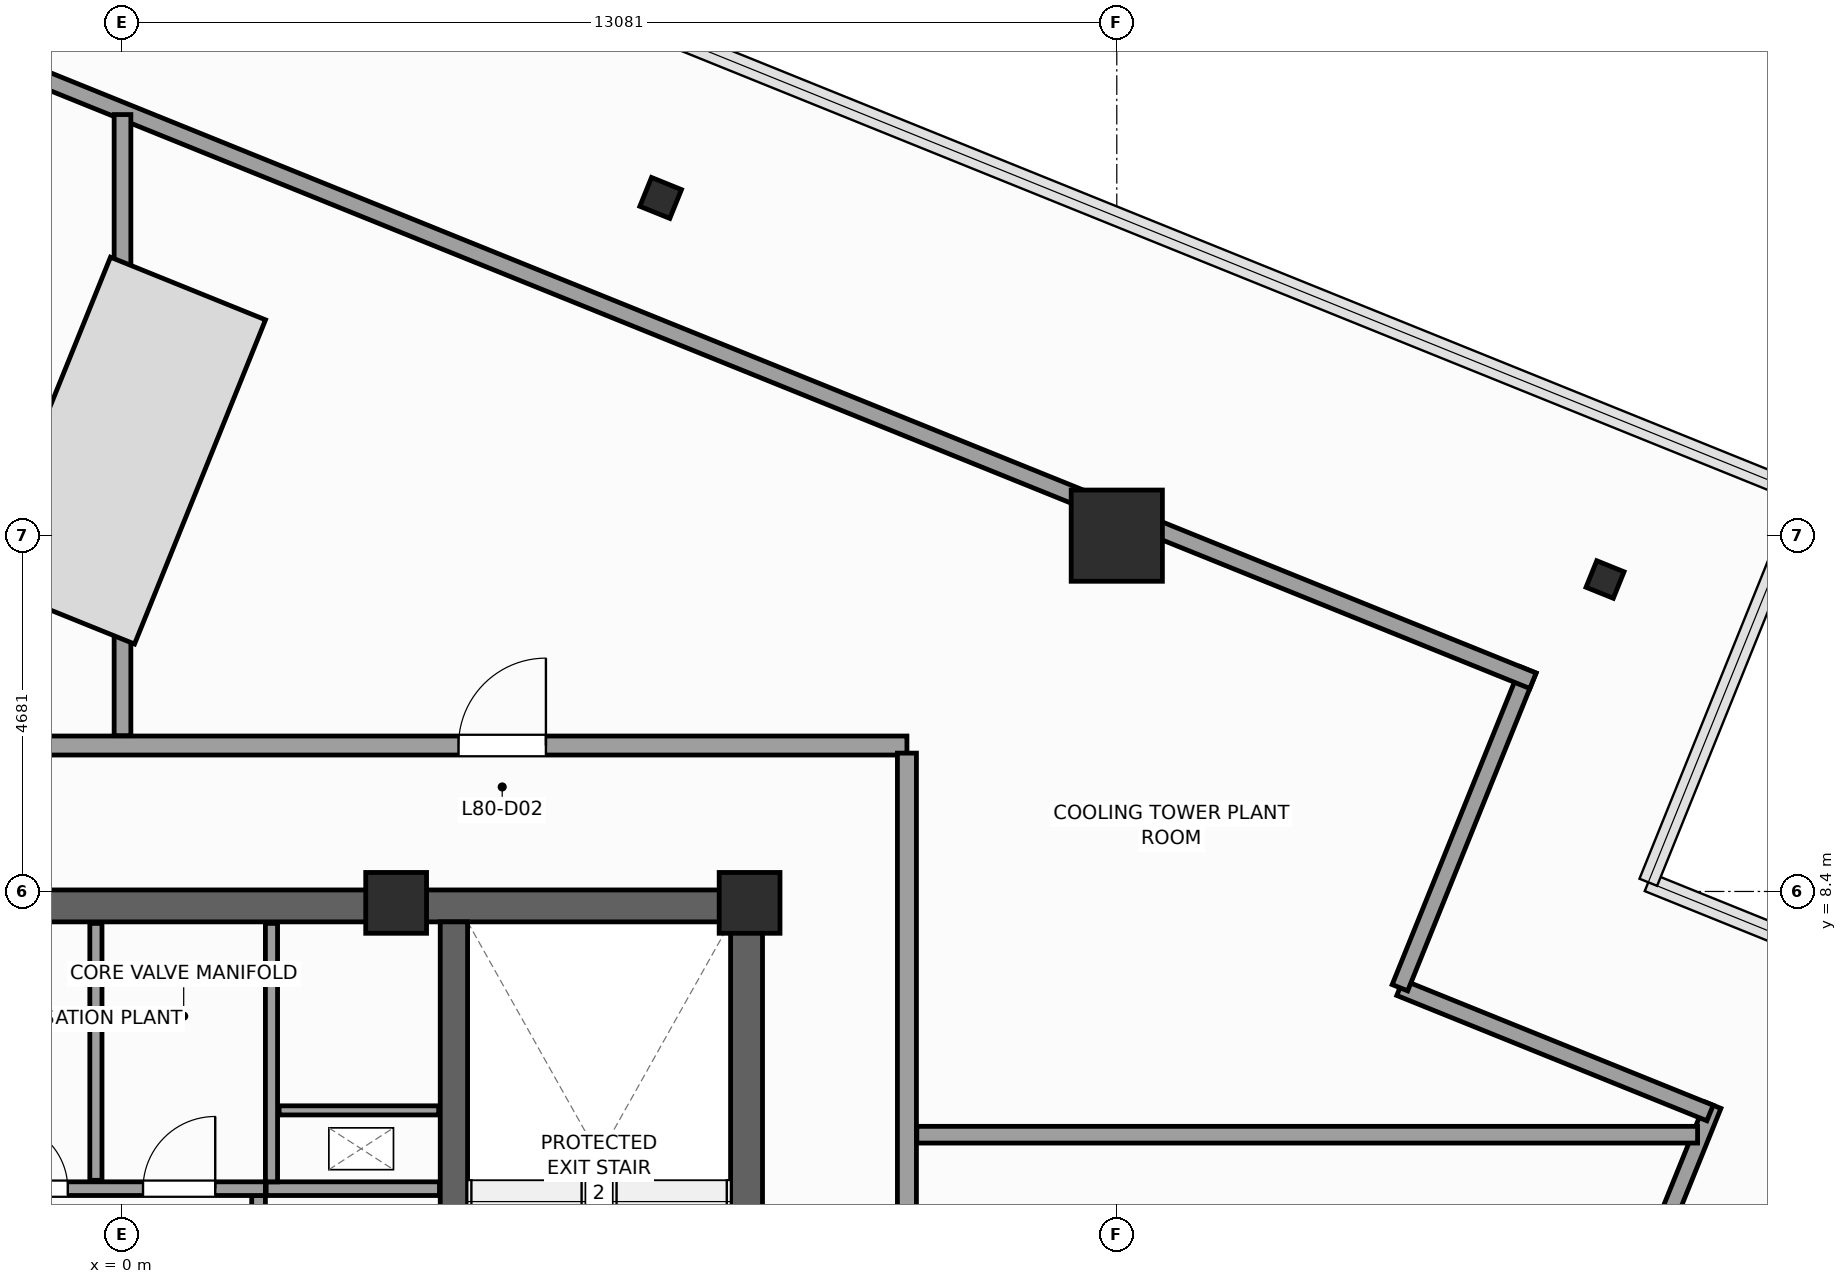
"""IFC4 building model, lengths in metres.
Left out: names, types, materials, properties, quantities, classifications, styles, units other than length and angle.
Written with IfcOpenShell. Run it as: python <this file> out.ifc"""

import sys

from ifc_helpers import new_model, si_unit, direction, frame, frame_2d, origin, origin_2d, place, context, subcontext, project, spatial, rectangle, i_section, extrude, source, transform, mapped, element, fill, save


model = new_model("IFC4")
c1 = context("Model", 3, precision=1e-05, world=origin(), true_north=direction((0.0, 1.0)))
c2 = subcontext(c1, "Body", "Model", "MODEL_VIEW")
j1 = project(units=[si_unit("LENGTHUNIT", "METRE"), si_unit("PLANEANGLEUNIT", "RADIAN")], contexts=[c1])
p1 = place(None, origin())
s1 = spatial("IfcSite", under=j1, at=p1, CompositionType="ELEMENT")
p2 = place(p1, origin())
s2 = spatial("IfcBuilding", under=s1, at=p2, CompositionType="ELEMENT")
p3 = place(p2, frame((0.0, 0.0, 325.6)))
s3 = spatial("IfcBuildingStorey", under=s2, at=p3, CompositionType="ELEMENT", Elevation=325.6)
p4 = place(p3, frame((-8.42, 8.21, 0.0), z_axis=(0.0, 0.0, 1.0), x_axis=(1.0, 0.0, 0.0)))
e1 = element("IfcWall", 1, at=p4, inside=s3, PredefinedType="SHEAR", context=c2, shape_type="SweptSolid", body=[
    extrude(rectangle(XDim=16.84, YDim=0.42, at=frame_2d((8.42, 0.0))), origin(), (0.0, 0.0, 1.0), 4.0),
])
p5 = place(p3, frame((8.21, -8.0, 0.0), z_axis=(0.0, 0.0, 1.0), x_axis=(0.0, 1.0, 0.0)))
e2 = element("IfcWall", 2, at=p5, inside=s3, PredefinedType="SHEAR", context=c2, shape_type="SweptSolid", body=[
    extrude(rectangle(XDim=16.0, YDim=0.42, at=frame_2d((8.0, 0.0))), origin(), (0.0, 0.0, 1.0), 4.0),
])
p6 = place(p5, frame((4.69, 0.0, 0.0)))
e3 = element("IfcOpeningElement", 3, at=p6, cuts=e2, PredefinedType="OPENING", context=c2, shape_type="SweptSolid", body=[
    extrude(rectangle(XDim=1.3, YDim=2.2, at=frame_2d((0.65, 1.1))), frame((0.0, 0.22, 0.0), z_axis=(0.0, -1.0, 0.0), x_axis=(1.0, 0.0, 0.0)), (0.0, 0.0, 1.0), 0.44),
])
p7 = place(p3, frame((4.36, -8.0, 0.0), z_axis=(0.0, 0.0, 1.0), x_axis=(0.0, 1.0, 0.0)))
e4 = element("IfcWall", 4, at=p7, inside=s3, PredefinedType="SHEAR", context=c2, shape_type="SweptSolid", body=[
    extrude(rectangle(XDim=16.0, YDim=0.36, at=frame_2d((8.0, 0.0))), origin(), (0.0, 0.0, 1.0), 4.0),
])
m1 = source(origin(), c2, "Body", "SweptSolid", [
    extrude(rectangle(XDim=0.8, YDim=0.8, at=origin_2d()), origin(), (0.0, 0.0, 1.0), 4.0),
])
for number, where, z_axis, x_axis in (
    (5, (8.25, 8.25, 0.0), (0.0, 0.0, 1.0), (1.0, 0.0, 0.0)),
    (6, (3.6, 8.25, 0.0), (0.0, 0.0, 1.0), (1.0, 0.0, 0.0)),
):
    element("IfcColumn", number, at=place(p3, frame(where, z_axis=z_axis, x_axis=x_axis)), inside=s3, PredefinedType="PILASTER", context=c2, shape_type="MappedRepresentation", body=[
        mapped(m1, transform((0.0, 0.0, 0.0), scale=1.0)),
    ])
m2 = source(origin(), c2, "Body", "SweptSolid", [
    extrude(rectangle(XDim=1.2, YDim=1.2, at=origin_2d()), origin(), (0.0, 0.0, 1.0), 4.0),
])
p8 = place(p3, frame((13.081, 13.081, 0.0), z_axis=(0.0, 0.0, 1.0), x_axis=(1.0, 0.0, 0.0)))
e7 = element("IfcColumn", 7, at=p8, inside=s3, PredefinedType="COLUMN", context=c2, shape_type="MappedRepresentation", body=[
    mapped(m2, transform((0.0, 0.0, 0.0), scale=1.0)),
])
m3 = source(origin(), c2, "Body", "SweptSolid", [
    extrude(i_section(OverallWidth=0.376, OverallDepth=0.387, WebThickness=0.02, FlangeThickness=0.032, FilletRadius=0.015, at=origin_2d()), origin(), (0.0, 0.0, 1.0), 4.0),
])
p9 = place(p3, frame((19.504, 12.504, 0.0), z_axis=(0.0, 0.0, 1.0), x_axis=(0.374606593416, 0.927183854567, 0.0)))
e8 = element("IfcColumn", 8, at=p9, inside=s3, PredefinedType="COLUMN", context=c2, shape_type="MappedRepresentation", body=[
    mapped(m3, transform((0.0, 0.0, 0.0), scale=1.0)),
])
m4 = source(origin(), c2, "Body", "SweptSolid", [
    extrude(i_section(OverallWidth=0.409, OverallDepth=0.425, WebThickness=0.024, FlangeThickness=0.039, FilletRadius=0.015, at=origin_2d()), origin(), (0.0, 0.0, 1.0), 4.0),
])
p10 = place(p3, frame((7.08, 17.524, 0.0), z_axis=(0.0, 0.0, 1.0), x_axis=(0.374606593416, 0.927183854567, 0.0)))
e9 = element("IfcColumn", 9, at=p10, inside=s3, PredefinedType="COLUMN", context=c2, shape_type="MappedRepresentation", body=[
    mapped(m4, transform((0.0, 0.0, 0.0), scale=1.0)),
])
p11 = place(p3, frame((1.79, -7.98, 0.0), z_axis=(0.0, 0.0, 1.0), x_axis=(0.0, 1.0, 0.0)))
e10 = element("IfcWall", 10, at=p11, inside=s3, PredefinedType="PARTITIONING", context=c2, shape_type="SweptSolid", body=[
    extrude(rectangle(XDim=12.38, YDim=0.18, at=frame_2d((6.19, 0.0))), origin(), (0.0, 0.0, 1.0), 3.7),
])
p12 = place(p11, frame((3.5, 0.0, 0.0)))
e11 = element("IfcOpeningElement", 11, at=p12, cuts=e10, PredefinedType="OPENING", context=c2, shape_type="SweptSolid", body=[
    extrude(rectangle(XDim=1.15, YDim=2.25, at=frame_2d((0.575, 1.125))), frame((0.0, 0.1, 0.0), z_axis=(0.0, -1.0, 0.0), x_axis=(1.0, 0.0, 0.0)), (0.0, 0.0, 1.0), 0.2),
])
p13 = place(p11, frame((9.8, 0.0, 0.0)))
e12 = element("IfcOpeningElement", 12, at=p13, cuts=e10, PredefinedType="OPENING", context=c2, shape_type="SweptSolid", body=[
    extrude(rectangle(XDim=1.15, YDim=2.25, at=frame_2d((0.575, 1.125))), frame((0.0, 0.1, 0.0), z_axis=(0.0, -1.0, 0.0), x_axis=(1.0, 0.0, 0.0)), (0.0, 0.0, 1.0), 0.2),
])
p14 = place(p3, frame((-1.88, 4.49, 0.0), z_axis=(0.0, 0.0, 1.0), x_axis=(1.0, 0.0, 0.0)))
e13 = element("IfcWall", 13, at=p14, inside=s3, PredefinedType="PARTITIONING", context=c2, shape_type="SweptSolid", body=[
    extrude(rectangle(XDim=3.76, YDim=0.18, at=frame_2d((1.88, 0.0))), origin(), (0.0, 0.0, 1.0), 3.7),
])
p15 = place(p14, frame((0.28, 0.0, 0.0)))
e14 = element("IfcOpeningElement", 14, at=p15, cuts=e13, PredefinedType="OPENING", context=c2, shape_type="SweptSolid", body=[
    extrude(rectangle(XDim=0.88, YDim=2.1, at=frame_2d((0.44, 1.05))), frame((0.0, 0.1, 0.0), z_axis=(0.0, -1.0, 0.0), x_axis=(1.0, 0.0, 0.0)), (0.0, 0.0, 1.0), 0.2),
])
p16 = place(p14, frame((2.15, 0.0, 0.0)))
e15 = element("IfcOpeningElement", 15, at=p16, cuts=e13, PredefinedType="OPENING", context=c2, shape_type="SweptSolid", body=[
    extrude(rectangle(XDim=0.95, YDim=2.1, at=frame_2d((0.475, 1.05))), frame((0.0, 0.1, 0.0), z_axis=(0.0, -1.0, 0.0), x_axis=(1.0, 0.0, 0.0)), (0.0, 0.0, 1.0), 0.2),
])
p17 = place(p3, frame((1.89, 4.49, 0.0), z_axis=(0.0, 0.0, 1.0), x_axis=(1.0, 0.0, 0.0)))
e16 = element("IfcWall", 16, at=p17, inside=s3, PredefinedType="PARTITIONING", context=c2, shape_type="SweptSolid", body=[
    extrude(rectangle(XDim=2.28, YDim=0.18, at=frame_2d((1.14, 0.0))), origin(), (0.0, 0.0, 1.0), 3.7),
])
p18 = place(p3, frame((1.96, 4.58, 0.0), z_axis=(0.0, 0.0, 1.0), x_axis=(0.0, 1.0, 0.0)))
e17 = element("IfcWall", 17, at=p18, inside=s3, PredefinedType="PARTITIONING", context=c2, shape_type="SweptSolid", body=[
    extrude(rectangle(XDim=3.4, YDim=0.16, at=frame_2d((1.7, 0.0))), origin(), (0.0, 0.0, 1.0), 3.7),
])
p19 = place(p3, frame((2.06, 5.52, 0.0), z_axis=(0.0, 0.0, 1.0), x_axis=(1.0, 0.0, 0.0)))
e18 = element("IfcWall", 18, at=p19, inside=s3, PredefinedType="PARTITIONING", context=c2, shape_type="SweptSolid", body=[
    extrude(rectangle(XDim=2.1, YDim=0.12, at=frame_2d((1.05, 0.0))), origin(), (0.0, 0.0, 1.0), 3.7),
])
p20 = place(p3, frame((-0.35, 4.6, 0.0), z_axis=(0.0, 0.0, 1.0), x_axis=(0.0, 1.0, 0.0)))
e19 = element("IfcWall", 19, at=p20, inside=s3, PredefinedType="PARTITIONING", context=c2, shape_type="SweptSolid", body=[
    extrude(rectangle(XDim=3.38, YDim=0.16, at=frame_2d((1.69, 0.0))), origin(), (0.0, 0.0, 1.0), 3.7),
])
p21 = place(p3, frame((11.172, -18.556, 0.0), z_axis=(0.0, 0.0, 1.0), x_axis=(0.374611707018, 0.927181788521, 0.0)))
e20 = element("IfcWall", 20, at=p21, inside=s3, PredefinedType="PARTITIONING", context=c2, shape_type="SweptSolid", body=[
    extrude(rectangle(XDim=26.04, YDim=0.22, at=frame_2d((13.02, 0.0))), origin(), (0.0, 0.0, 1.0), 3.05),
])
p22 = place(p3, frame((20.886, 5.486, 0.0), z_axis=(0.0, 0.0, 1.0), x_axis=(-0.927189216671, 0.374593321469, 0.0)))
e21 = element("IfcWall", 21, at=p22, inside=s3, PredefinedType="PARTITIONING", context=c2, shape_type="SweptSolid", body=[
    extrude(rectangle(XDim=4.4, YDim=0.22, at=frame_2d((2.2, 0.0))), origin(), (0.0, 0.0, 1.0), 3.7),
])
p23 = place(p3, frame((16.806, 7.134, 0.0), z_axis=(0.0, 0.0, 1.0), x_axis=(0.374599091925, 0.927186885331, 0.0)))
e22 = element("IfcWall", 22, at=p23, inside=s3, PredefinedType="PARTITIONING", context=c2, shape_type="SweptSolid", body=[
    extrude(rectangle(XDim=4.51, YDim=0.22, at=frame_2d((2.255, 0.0))), origin(), (0.0, 0.0, 1.0), 3.7),
])
p24 = place(p3, frame((18.556, 11.172, 0.0), z_axis=(0.0, 0.0, 1.0), x_axis=(-0.927181788521, 0.374611707018, 0.0)))
e23 = element("IfcWall", 23, at=p24, inside=s3, PredefinedType="PARTITIONING", context=c2, shape_type="SweptSolid", body=[
    extrude(rectangle(XDim=26.04, YDim=0.22, at=frame_2d((13.02, 0.0))), origin(), (0.0, 0.0, 1.0), 3.05),
])
p25 = place(p3, frame((-10.32, 10.32, 0.0), z_axis=(0.0, 0.0, 1.0), x_axis=(1.0, 0.0, 0.0)))
e24 = element("IfcWall", 24, at=p25, inside=s3, PredefinedType="PARTITIONING", context=c2, shape_type="SweptSolid", body=[
    extrude(rectangle(XDim=20.64, YDim=0.25, at=frame_2d((10.32, 0.0))), origin(), (0.0, 0.0, 1.0), 3.7),
])
p26 = place(p25, frame((4.75, 0.0, 0.0)))
e25 = element("IfcOpeningElement", 25, at=p26, cuts=e24, PredefinedType="OPENING", context=c2, shape_type="SweptSolid", body=[
    extrude(rectangle(XDim=1.15, YDim=2.25, at=frame_2d((0.575, 1.125))), frame((0.0, 0.135, 0.0), z_axis=(0.0, -1.0, 0.0), x_axis=(1.0, 0.0, 0.0)), (0.0, 0.0, 1.0), 0.27),
])
p27 = place(p25, frame((14.74, 0.0, 0.0)))
e26 = element("IfcOpeningElement", 26, at=p27, cuts=e24, PredefinedType="OPENING", context=c2, shape_type="SweptSolid", body=[
    extrude(rectangle(XDim=1.15, YDim=2.25, at=frame_2d((0.575, 1.125))), frame((0.0, 0.135, 0.0), z_axis=(0.0, -1.0, 0.0), x_axis=(1.0, 0.0, 0.0)), (0.0, 0.0, 1.0), 0.27),
])
p28 = place(p3, frame((10.32, -10.22, 0.0), z_axis=(0.0, 0.0, 1.0), x_axis=(0.0, 1.0, 0.0)))
e27 = element("IfcWall", 27, at=p28, inside=s3, PredefinedType="PARTITIONING", context=c2, shape_type="SweptSolid", body=[
    extrude(rectangle(XDim=20.44, YDim=0.25, at=frame_2d((10.22, 0.0))), origin(), (0.0, 0.0, 1.0), 3.7),
])
p29 = place(p28, frame((9.645, 0.0, 0.0)))
e28 = element("IfcOpeningElement", 28, at=p29, cuts=e27, PredefinedType="OPENING", context=c2, shape_type="SweptSolid", body=[
    extrude(rectangle(XDim=1.15, YDim=2.25, at=frame_2d((0.575, 1.125))), frame((0.0, 0.135, 0.0), z_axis=(0.0, -1.0, 0.0), x_axis=(1.0, 0.0, 0.0)), (0.0, 0.0, 1.0), 0.27),
])
p30 = place(p3, frame((0.0, 10.45, 0.0), z_axis=(0.0, 0.0, 1.0), x_axis=(0.0, 1.0, 0.0)))
e29 = element("IfcWall", 29, at=p30, inside=s3, PredefinedType="PARTITIONING", context=c2, shape_type="SweptSolid", body=[
    extrude(rectangle(XDim=8.171, YDim=0.22, at=frame_2d((4.085, 0.0))), origin(), (0.0, 0.0, 1.0), 3.7),
])
p31 = place(p3, frame((10.45, 5.2, 0.0), z_axis=(0.0, 0.0, 1.0), x_axis=(1.0, 0.0, 0.0)))
e30 = element("IfcWall", 30, at=p31, inside=s3, PredefinedType="PARTITIONING", context=c2, shape_type="SweptSolid", body=[
    extrude(rectangle(XDim=10.272, YDim=0.22, at=frame_2d((5.136, 0.0))), origin(), (0.0, 0.0, 1.0), 3.7),
])
m5 = source(origin(), c2, "Body", "SweptSolid", [
    extrude(rectangle(XDim=0.88, YDim=2.1, at=frame_2d((0.44, 1.05))), frame((0.0, 0.025, 0.0), z_axis=(0.0, -1.0, 0.0), x_axis=(1.0, 0.0, 0.0)), (0.0, 0.0, 1.0), 0.05),
])
p32 = place(p15, origin())
e31 = element("IfcDoor", 31, at=p32, inside=s3, OperationType="SINGLE_SWING_LEFT", PredefinedType="DOOR", context=c2, shape_type="MappedRepresentation", body=[
    mapped(m5, transform((0.0, 0.0, 0.0), scale=1.0)),
])
fill(e14, e31)
m6 = source(origin(), c2, "Body", "SweptSolid", [
    extrude(rectangle(XDim=0.95, YDim=2.1, at=frame_2d((0.475, 1.05))), frame((0.0, 0.025, 0.0), z_axis=(0.0, -1.0, 0.0), x_axis=(1.0, 0.0, 0.0)), (0.0, 0.0, 1.0), 0.05),
])
p33 = place(p16, origin())
e32 = element("IfcDoor", 32, at=p33, inside=s3, OperationType="SINGLE_SWING_RIGHT", PredefinedType="DOOR", context=c2, shape_type="MappedRepresentation", body=[
    mapped(m6, transform((0.0, 0.0, 0.0), scale=1.0)),
])
fill(e15, e32)
m7 = source(origin(), c2, "Body", "SweptSolid", [
    extrude(rectangle(XDim=1.15, YDim=2.25, at=frame_2d((0.575, 1.125))), frame((0.0, 0.025, 0.0), z_axis=(0.0, -1.0, 0.0), x_axis=(1.0, 0.0, 0.0)), (0.0, 0.0, 1.0), 0.05),
])
p34 = place(p27, origin())
e33 = element("IfcDoor", 33, at=p34, inside=s3, OperationType="SINGLE_SWING_RIGHT", PredefinedType="DOOR", context=c2, shape_type="MappedRepresentation", body=[
    mapped(m7, transform((0.0, 0.0, 0.0), scale=1.0)),
])
fill(e26, e33)
save(model, sys.argv[1])
